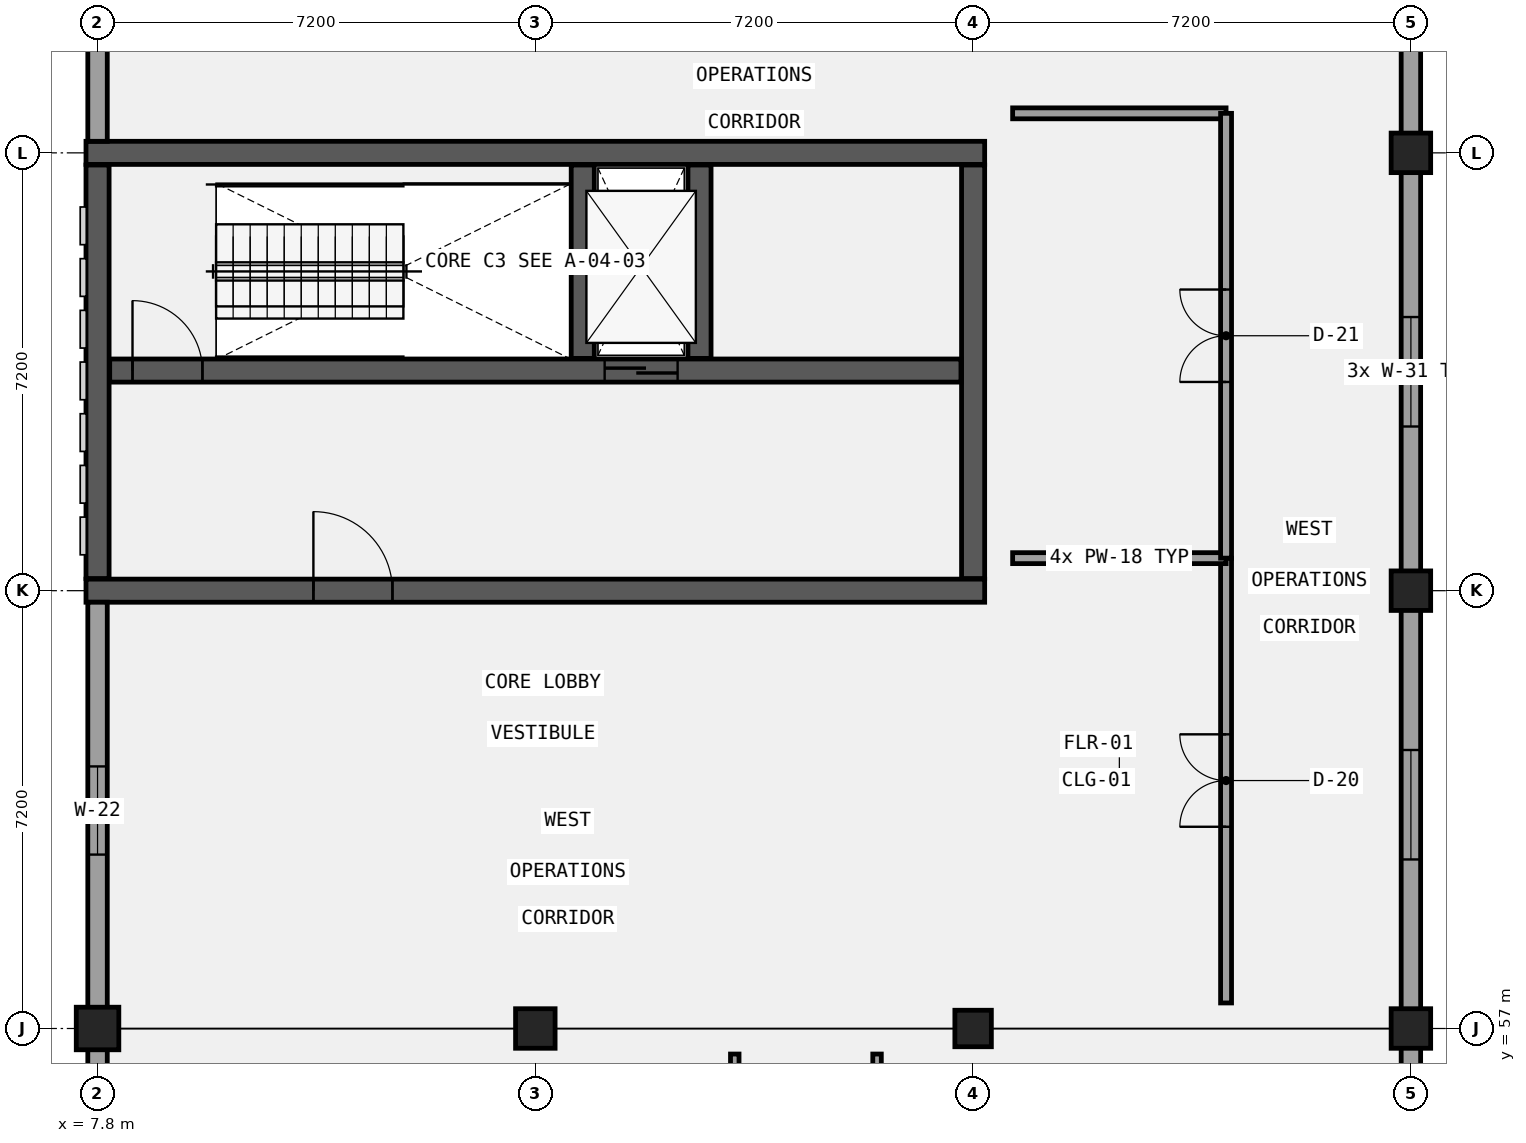
"""IFC4 building model, lengths in metres.
Left out: names, types, materials, properties, quantities, classifications, styles, units other than length and angle.
Written with IfcOpenShell. Run it as: python <this file> out.ifc"""

import sys

from ifc_helpers import new_model, si_unit, direction, frame, frame_2d, origin, origin_2d, place, context, subcontext, project, spatial, rectangle, circle, extrude, element, fill, save


model = new_model("IFC4")
c1 = context("Model", 3, precision=1e-05, world=origin(), true_north=direction((0.0, 1.0)))
c2 = subcontext(c1, "Body", "Model", "MODEL_VIEW")
j1 = project(units=[si_unit("LENGTHUNIT", "METRE"), si_unit("PLANEANGLEUNIT", "RADIAN")], contexts=[c1])
p1 = place(None, origin())
s1 = spatial("IfcSite", under=j1, at=p1, CompositionType="ELEMENT")
p2 = place(p1, origin())
s2 = spatial("IfcBuilding", under=s1, at=p2, CompositionType="ELEMENT")
p3 = place(p2, frame((0.0, 0.0, 9.6)))
s3 = spatial("IfcBuildingStorey", under=s2, at=p3, CompositionType="ELEMENT", Elevation=9.6)
p4 = place(p3, frame((7.61, 71.4, 0.0), z_axis=(0.0, 0.0, 1.0), x_axis=(1.0, 0.0, 0.0)))
e1 = element("IfcWall", 1, at=p4, inside=s3, PredefinedType="SHEAR", context=c2, shape_type="SweptSolid", body=[
    extrude(rectangle(XDim=14.78, YDim=0.38, at=frame_2d((7.39, 0.0))), origin(), (0.0, 0.0, 1.0), 4.2),
])
p5 = place(p3, frame((7.61, 64.2, 0.0), z_axis=(0.0, 0.0, 1.0), x_axis=(1.0, 0.0, 0.0)))
e2 = element("IfcWall", 2, at=p5, inside=s3, PredefinedType="SHEAR", context=c2, shape_type="SweptSolid", body=[
    extrude(rectangle(XDim=14.78, YDim=0.38, at=frame_2d((7.39, 0.0))), origin(), (0.0, 0.0, 1.0), 4.2),
])
p6 = place(p5, frame((3.74, 0.0, 0.0)))
e3 = element("IfcOpeningElement", 3, at=p6, cuts=e2, PredefinedType="OPENING", context=c2, shape_type="SweptSolid", body=[
    extrude(rectangle(XDim=1.3, YDim=2.2, at=frame_2d((0.65, 1.1))), frame((0.0, 0.2, 0.0), z_axis=(0.0, -1.0, 0.0), x_axis=(1.0, 0.0, 0.0)), (0.0, 0.0, 1.0), 0.4),
])
for number, where, z_axis, x_axis in (
    (4, (7.8, 64.4, 0.0), (0.0, 0.0, 1.0), (0.0, 1.0, 0.0)),
    (5, (22.2, 64.4, 0.0), (0.0, 0.0, 1.0), (0.0, 1.0, 0.0)),
):
    element("IfcWall", number, at=place(p3, frame(where, z_axis=z_axis, x_axis=x_axis)), inside=s3, PredefinedType="SHEAR", context=c2, shape_type="SweptSolid", body=[
        extrude(rectangle(XDim=6.8, YDim=0.38, at=frame_2d((3.4, 0.0))), origin(), (0.0, 0.0, 1.0), 4.2),
    ])
p7 = place(p3, frame((8.0, 67.82, 0.0), z_axis=(0.0, 0.0, 1.0), x_axis=(1.0, 0.0, 0.0)))
e6 = element("IfcWall", 6, at=p7, inside=s3, PredefinedType="SHEAR", context=c2, shape_type="SweptSolid", body=[
    extrude(rectangle(XDim=14.0, YDim=0.38, at=frame_2d((7.0, 0.0))), origin(), (0.0, 0.0, 1.0), 4.2),
])
p8 = place(p7, frame((8.14, 0.0, 0.0)))
e7 = element("IfcOpeningElement", 7, at=p8, cuts=e6, PredefinedType="OPENING", context=c2, shape_type="SweptSolid", body=[
    extrude(rectangle(XDim=1.2, YDim=2.15, at=frame_2d((0.6, 1.075))), frame((0.0, 0.2, 0.0), z_axis=(0.0, -1.0, 0.0), x_axis=(1.0, 0.0, 0.0)), (0.0, 0.0, 1.0), 0.4),
])
p9 = place(p7, frame((0.375, 0.0, 0.0)))
e8 = element("IfcOpeningElement", 8, at=p9, cuts=e6, PredefinedType="OPENING", context=c2, shape_type="SweptSolid", body=[
    extrude(rectangle(XDim=1.15, YDim=2.15, at=frame_2d((0.575, 1.075))), frame((0.0, 0.2, 0.0), z_axis=(0.0, -1.0, 0.0), x_axis=(1.0, 0.0, 0.0)), (0.0, 0.0, 1.0), 0.4),
])
for number, where, z_axis, x_axis in (
    (9, (15.78, 68.02, 0.0), (0.0, 0.0, 1.0), (0.0, 1.0, 0.0)),
    (10, (17.7, 68.02, 0.0), (0.0, 0.0, 1.0), (0.0, 1.0, 0.0)),
):
    element("IfcWall", number, at=place(p3, frame(where, z_axis=z_axis, x_axis=x_axis)), inside=s3, PredefinedType="SHEAR", context=c2, shape_type="SweptSolid", body=[
        extrude(rectangle(XDim=3.18, YDim=0.38, at=frame_2d((1.59, 0.0))), origin(), (0.0, 0.0, 1.0), 4.2),
    ])
p10 = place(p3, frame((7.8, 57.0, 0.0), z_axis=(0.0, 0.0, 1.0), x_axis=(1.0, 0.0, 0.0)))
e11 = element("IfcColumn", 11, at=p10, inside=s3, PredefinedType="COLUMN", context=c2, shape_type="SweptSolid", body=[
    extrude(rectangle(XDim=0.7, YDim=0.7, at=origin_2d()), origin(), (0.0, 0.0, 1.0), 4.2),
])
p11 = place(p3, frame((15.0, 57.0, 0.0), z_axis=(0.0, 0.0, 1.0), x_axis=(1.0, 0.0, 0.0)))
e12 = element("IfcColumn", 12, at=p11, inside=s3, PredefinedType="COLUMN", context=c2, shape_type="SweptSolid", body=[
    extrude(rectangle(XDim=0.65, YDim=0.65, at=origin_2d()), origin(), (0.0, 0.0, 1.0), 4.2),
])
p12 = place(p3, frame((22.2, 57.0, 0.0), z_axis=(0.0, 0.0, 1.0), x_axis=(1.0, 0.0, 0.0)))
e13 = element("IfcColumn", 13, at=p12, inside=s3, PredefinedType="COLUMN", context=c2, shape_type="SweptSolid", body=[
    extrude(rectangle(XDim=0.6, YDim=0.6, at=origin_2d()), origin(), (0.0, 0.0, 1.0), 4.2),
])
for number, where, z_axis, x_axis in (
    (14, (29.4, 57.0, 0.0), (0.0, 0.0, 1.0), (1.0, 0.0, 0.0)),
    (15, (29.4, 64.2, 0.0), (0.0, 0.0, 1.0), (1.0, 0.0, 0.0)),
    (16, (29.4, 71.4, 0.0), (0.0, 0.0, 1.0), (1.0, 0.0, 0.0)),
):
    element("IfcColumn", number, at=place(p3, frame(where, z_axis=z_axis, x_axis=x_axis)), inside=s3, PredefinedType="COLUMN", context=c2, shape_type="SweptSolid", body=[
        extrude(circle(Radius=0.325, at=origin_2d()), origin(), (0.0, 0.0, 1.0), 4.2),
    ])
p13 = place(p3, frame((7.8, 78.44, 0.0), z_axis=(0.0, 0.0, 1.0), x_axis=(0.0, -1.0, 0.0)))
e17 = element("IfcWall", 17, at=p13, inside=s3, PredefinedType="SOLIDWALL", context=c2, shape_type="SweptSolid", body=[
    extrude(rectangle(XDim=6.85, YDim=0.32, at=frame_2d((3.425, 0.0))), origin(), (0.0, 0.0, 1.0), 3.39),
])
p14 = place(p13, frame((2.525, 0.0, 1.0)))
e18 = element("IfcOpeningElement", 18, at=p14, cuts=e17, PredefinedType="OPENING", context=c2, shape_type="SweptSolid", body=[
    extrude(rectangle(XDim=1.8, YDim=2.15, at=frame_2d((0.9, 1.075))), frame((0.0, 0.17, 0.0), z_axis=(0.0, -1.0, 0.0), x_axis=(1.0, 0.0, 0.0)), (0.0, 0.0, 1.0), 0.34),
])
p15 = place(p3, frame((7.8, 64.01, 0.0), z_axis=(0.0, 0.0, 1.0), x_axis=(0.0, -1.0, 0.0)))
e19 = element("IfcWall", 19, at=p15, inside=s3, PredefinedType="SOLIDWALL", context=c2, shape_type="SweptSolid", body=[
    extrude(rectangle(XDim=6.85, YDim=0.32, at=frame_2d((3.425, 0.0))), origin(), (0.0, 0.0, 1.0), 3.04),
])
p16 = place(p15, frame((2.7, 0.0, 1.0)))
e20 = element("IfcOpeningElement", 20, at=p16, cuts=e19, PredefinedType="OPENING", context=c2, shape_type="SweptSolid", body=[
    extrude(rectangle(XDim=1.45, YDim=1.65, at=frame_2d((0.725, 0.825))), frame((0.0, 0.17, 0.0), z_axis=(0.0, -1.0, 0.0), x_axis=(1.0, 0.0, 0.0)), (0.0, 0.0, 1.0), 0.34),
])
p17 = place(p3, frame((7.8, 56.84, 0.0), z_axis=(0.0, 0.0, 1.0), x_axis=(0.0, -1.0, 0.0)))
e21 = element("IfcWall", 21, at=p17, inside=s3, PredefinedType="SOLIDWALL", context=c2, shape_type="SweptSolid", body=[
    extrude(rectangle(XDim=35.68, YDim=0.32, at=frame_2d((17.84, 0.0))), origin(), (0.0, 0.0, 1.0), 3.09),
])
p18 = place(p17, frame((31.36, 0.0, 1.0)))
e22 = element("IfcOpeningElement", 22, at=p18, cuts=e21, PredefinedType="OPENING", context=c2, shape_type="SweptSolid", body=[
    extrude(rectangle(XDim=1.6, YDim=1.4, at=frame_2d((0.8, 0.7))), frame((0.0, 0.17, 0.0), z_axis=(0.0, -1.0, 0.0), x_axis=(1.0, 0.0, 0.0)), (0.0, 0.0, 1.0), 0.34),
])
p19 = place(p17, frame((24.24, 0.0, 1.0)))
e23 = element("IfcOpeningElement", 23, at=p19, cuts=e21, PredefinedType="OPENING", context=c2, shape_type="SweptSolid", body=[
    extrude(rectangle(XDim=1.6, YDim=1.4, at=frame_2d((0.8, 0.7))), frame((0.0, 0.17, 0.0), z_axis=(0.0, -1.0, 0.0), x_axis=(1.0, 0.0, 0.0)), (0.0, 0.0, 1.0), 0.34),
])
p20 = place(p17, frame((17.04, 0.0, 1.0)))
e24 = element("IfcOpeningElement", 24, at=p20, cuts=e21, PredefinedType="OPENING", context=c2, shape_type="SweptSolid", body=[
    extrude(rectangle(XDim=1.6, YDim=1.4, at=frame_2d((0.8, 0.7))), frame((0.0, 0.17, 0.0), z_axis=(0.0, -1.0, 0.0), x_axis=(1.0, 0.0, 0.0)), (0.0, 0.0, 1.0), 0.34),
])
p21 = place(p17, frame((9.84, 0.0, 1.0)))
e25 = element("IfcOpeningElement", 25, at=p21, cuts=e21, PredefinedType="OPENING", context=c2, shape_type="SweptSolid", body=[
    extrude(rectangle(XDim=1.6, YDim=1.4, at=frame_2d((0.8, 0.7))), frame((0.0, 0.17, 0.0), z_axis=(0.0, -1.0, 0.0), x_axis=(1.0, 0.0, 0.0)), (0.0, 0.0, 1.0), 0.34),
])
p22 = place(p17, frame((2.72, 0.0, 1.0)))
e26 = element("IfcOpeningElement", 26, at=p22, cuts=e21, PredefinedType="OPENING", context=c2, shape_type="SweptSolid", body=[
    extrude(rectangle(XDim=1.6, YDim=1.4, at=frame_2d((0.8, 0.7))), frame((0.0, 0.17, 0.0), z_axis=(0.0, -1.0, 0.0), x_axis=(1.0, 0.0, 0.0)), (0.0, 0.0, 1.0), 0.34),
])
p23 = place(p3, frame((29.4, 35.56, 0.0), z_axis=(0.0, 0.0, 1.0), x_axis=(0.0, 1.0, 0.0)))
e27 = element("IfcWall", 27, at=p23, inside=s3, PredefinedType="SOLIDWALL", context=c2, shape_type="SweptSolid", body=[
    extrude(rectangle(XDim=21.28, YDim=0.32, at=frame_2d((10.64, 0.0))), origin(), (0.0, 0.0, 1.0), 2.94),
])
p24 = place(p23, frame((2.42, 0.0, 1.0)))
e28 = element("IfcOpeningElement", 28, at=p24, cuts=e27, PredefinedType="OPENING", context=c2, shape_type="SweptSolid", body=[
    extrude(rectangle(XDim=2.2, YDim=1.65, at=frame_2d((1.1, 0.825))), frame((0.0, 0.17, 0.0), z_axis=(0.0, -1.0, 0.0), x_axis=(1.0, 0.0, 0.0)), (0.0, 0.0, 1.0), 0.34),
])
p25 = place(p23, frame((9.54, 0.0, 1.0)))
e29 = element("IfcOpeningElement", 29, at=p25, cuts=e27, PredefinedType="OPENING", context=c2, shape_type="SweptSolid", body=[
    extrude(rectangle(XDim=2.2, YDim=1.65, at=frame_2d((1.1, 0.825))), frame((0.0, 0.17, 0.0), z_axis=(0.0, -1.0, 0.0), x_axis=(1.0, 0.0, 0.0)), (0.0, 0.0, 1.0), 0.34),
])
p26 = place(p23, frame((16.66, 0.0, 1.0)))
e30 = element("IfcOpeningElement", 30, at=p26, cuts=e27, PredefinedType="OPENING", context=c2, shape_type="SweptSolid", body=[
    extrude(rectangle(XDim=2.2, YDim=1.65, at=frame_2d((1.1, 0.825))), frame((0.0, 0.17, 0.0), z_axis=(0.0, -1.0, 0.0), x_axis=(1.0, 0.0, 0.0)), (0.0, 0.0, 1.0), 0.34),
])
p27 = place(p3, frame((29.4, 57.16, 0.0), z_axis=(0.0, 0.0, 1.0), x_axis=(0.0, 1.0, 0.0)))
e31 = element("IfcWall", 31, at=p27, inside=s3, PredefinedType="SOLIDWALL", context=c2, shape_type="SweptSolid", body=[
    extrude(rectangle(XDim=21.28, YDim=0.32, at=frame_2d((10.64, 0.0))), origin(), (0.0, 0.0, 1.0), 3.19),
])
p28 = place(p27, frame((2.62, 0.0, 1.0)))
e32 = element("IfcOpeningElement", 32, at=p28, cuts=e31, PredefinedType="OPENING", context=c2, shape_type="SweptSolid", body=[
    extrude(rectangle(XDim=1.8, YDim=1.4, at=frame_2d((0.9, 0.7))), frame((0.0, 0.17, 0.0), z_axis=(0.0, -1.0, 0.0), x_axis=(1.0, 0.0, 0.0)), (0.0, 0.0, 1.0), 0.34),
])
p29 = place(p27, frame((9.74, 0.0, 1.0)))
e33 = element("IfcOpeningElement", 33, at=p29, cuts=e31, PredefinedType="OPENING", context=c2, shape_type="SweptSolid", body=[
    extrude(rectangle(XDim=1.8, YDim=1.4, at=frame_2d((0.9, 0.7))), frame((0.0, 0.17, 0.0), z_axis=(0.0, -1.0, 0.0), x_axis=(1.0, 0.0, 0.0)), (0.0, 0.0, 1.0), 0.34),
])
p30 = place(p27, frame((16.86, 0.0, 1.0)))
e34 = element("IfcOpeningElement", 34, at=p30, cuts=e31, PredefinedType="OPENING", context=c2, shape_type="SweptSolid", body=[
    extrude(rectangle(XDim=1.8, YDim=1.4, at=frame_2d((0.9, 0.7))), frame((0.0, 0.17, 0.0), z_axis=(0.0, -1.0, 0.0), x_axis=(1.0, 0.0, 0.0)), (0.0, 0.0, 1.0), 0.34),
])
p31 = place(p3, frame((18.28, 49.548, 0.0), z_axis=(0.0, 0.0, 1.0), x_axis=(0.0, 1.0, 0.0)))
e35 = element("IfcWall", 35, at=p31, inside=s3, PredefinedType="PARTITIONING", context=c2, shape_type="SweptSolid", body=[
    extrude(rectangle(XDim=7.032, YDim=0.14, at=frame_2d((3.516, 0.0))), origin(), (0.0, 0.0, 1.0), 3.94),
])
p32 = place(p31, frame((2.966, 0.0, 0.0)))
e36 = element("IfcOpeningElement", 36, at=p32, cuts=e35, PredefinedType="OPENING", context=c2, shape_type="SweptSolid", body=[
    extrude(rectangle(XDim=1.1, YDim=2.35, at=frame_2d((0.55, 1.175))), frame((0.0, 0.08, 0.0), z_axis=(0.0, -1.0, 0.0), x_axis=(1.0, 0.0, 0.0)), (0.0, 0.0, 1.0), 0.16),
])
p33 = place(p3, frame((20.62, 49.548, 0.0), z_axis=(0.0, 0.0, 1.0), x_axis=(0.0, 1.0, 0.0)))
e37 = element("IfcWall", 37, at=p33, inside=s3, PredefinedType="PARTITIONING", context=c2, shape_type="SweptSolid", body=[
    extrude(rectangle(XDim=7.032, YDim=0.14, at=frame_2d((3.516, 0.0))), origin(), (0.0, 0.0, 1.0), 3.94),
])
p34 = place(p33, frame((2.836, 0.0, 0.0)))
e38 = element("IfcOpeningElement", 38, at=p34, cuts=e37, PredefinedType="OPENING", context=c2, shape_type="SweptSolid", body=[
    extrude(rectangle(XDim=1.36, YDim=2.22, at=frame_2d((0.68, 1.11))), frame((0.0, 0.08, 0.0), z_axis=(0.0, -1.0, 0.0), x_axis=(1.0, 0.0, 0.0)), (0.0, 0.0, 1.0), 0.16),
])
p35 = place(p3, frame((22.85, 72.05, 0.0), z_axis=(0.0, 0.0, 1.0), x_axis=(1.0, 0.0, 0.0)))
e39 = element("IfcWall", 39, at=p35, inside=s3, PredefinedType="PARTITIONING", context=c2, shape_type="SweptSolid", body=[
    extrude(rectangle(XDim=3.51, YDim=0.18, at=frame_2d((1.755, 0.0))), origin(), (0.0, 0.0, 1.0), 3.94),
])
p36 = place(p3, frame((26.36, 57.42, 0.0), z_axis=(0.0, 0.0, 1.0), x_axis=(0.0, 1.0, 0.0)))
e40 = element("IfcWall", 40, at=p36, inside=s3, PredefinedType="PARTITIONING", context=c2, shape_type="SweptSolid", body=[
    extrude(rectangle(XDim=7.315, YDim=0.18, at=frame_2d((3.658, 0.0))), origin(), (0.0, 0.0, 1.0), 3.94),
])
p37 = place(p36, frame((2.897, 0.0, 0.0)))
e41 = element("IfcOpeningElement", 41, at=p37, cuts=e40, PredefinedType="OPENING", context=c2, shape_type="SweptSolid", body=[
    extrude(rectangle(XDim=1.52, YDim=2.22, at=frame_2d((0.76, 1.11))), frame((0.0, 0.1, 0.0), z_axis=(0.0, -1.0, 0.0), x_axis=(1.0, 0.0, 0.0)), (0.0, 0.0, 1.0), 0.2),
])
p38 = place(p3, frame((22.85, 64.735, 0.0), z_axis=(0.0, 0.0, 1.0), x_axis=(1.0, 0.0, 0.0)))
e42 = element("IfcWall", 42, at=p38, inside=s3, PredefinedType="PARTITIONING", context=c2, shape_type="SweptSolid", body=[
    extrude(rectangle(XDim=3.51, YDim=0.18, at=frame_2d((1.755, 0.0))), origin(), (0.0, 0.0, 1.0), 3.94),
])
p39 = place(p3, frame((26.36, 64.735, 0.0), z_axis=(0.0, 0.0, 1.0), x_axis=(0.0, 1.0, 0.0)))
e43 = element("IfcWall", 43, at=p39, inside=s3, PredefinedType="PARTITIONING", context=c2, shape_type="SweptSolid", body=[
    extrude(rectangle(XDim=7.315, YDim=0.18, at=frame_2d((3.657, 0.0))), origin(), (0.0, 0.0, 1.0), 3.94),
])
p40 = place(p39, frame((2.897, 0.0, 0.0)))
e44 = element("IfcOpeningElement", 44, at=p40, cuts=e43, PredefinedType="OPENING", context=c2, shape_type="SweptSolid", body=[
    extrude(rectangle(XDim=1.52, YDim=2.35, at=frame_2d((0.76, 1.175))), frame((0.0, 0.1, 0.0), z_axis=(0.0, -1.0, 0.0), x_axis=(1.0, 0.0, 0.0)), (0.0, 0.0, 1.0), 0.2),
])
p41 = place(p8, frame((1.2, 0.0, 0.0), z_axis=(0.0, 0.0, 1.0), x_axis=(-1.0, 0.0, 0.0)))
e45 = element("IfcDoor", 45, at=p41, inside=s3, OperationType="DOUBLE_DOOR_SLIDING", PredefinedType="DOOR", context=c2, shape_type="SweptSolid", body=[
    extrude(rectangle(XDim=1.2, YDim=2.15, at=frame_2d((0.6, 1.075))), frame((0.0, 0.025, 0.0), z_axis=(0.0, -1.0, 0.0), x_axis=(1.0, 0.0, 0.0)), (0.0, 0.0, 1.0), 0.05),
])
fill(e7, e45)
p42 = place(p9, origin())
e46 = element("IfcDoor", 46, at=p42, inside=s3, OperationType="SINGLE_SWING_LEFT", PredefinedType="DOOR", context=c2, shape_type="SweptSolid", body=[
    extrude(rectangle(XDim=1.15, YDim=2.15, at=frame_2d((0.575, 1.075))), frame((0.0, 0.025, 0.0), z_axis=(0.0, -1.0, 0.0), x_axis=(1.0, 0.0, 0.0)), (0.0, 0.0, 1.0), 0.05),
])
fill(e8, e46)
p43 = place(p6, frame((1.3, 0.0, 0.0), z_axis=(0.0, 0.0, 1.0), x_axis=(-1.0, 0.0, 0.0)))
e47 = element("IfcDoor", 47, at=p43, inside=s3, OperationType="SINGLE_SWING_LEFT", PredefinedType="DOOR", context=c2, shape_type="SweptSolid", body=[
    extrude(rectangle(XDim=1.3, YDim=2.2, at=frame_2d((0.65, 1.1))), frame((0.0, 0.025, 0.0), z_axis=(0.0, -1.0, 0.0), x_axis=(1.0, 0.0, 0.0)), (0.0, 0.0, 1.0), 0.05),
])
fill(e3, e47)
p44 = place(p16, origin())
e48 = element("IfcWindow", 48, at=p44, inside=s3, PartitioningType="SINGLE_PANEL", PredefinedType="WINDOW", context=c2, shape_type="SweptSolid", body=[
    extrude(rectangle(XDim=1.45, YDim=1.65, at=frame_2d((0.725, 0.825))), frame((0.0, 0.03, 0.0), z_axis=(0.0, -1.0, 0.0), x_axis=(1.0, 0.0, 0.0)), (0.0, 0.0, 1.0), 0.06),
])
fill(e20, e48)
p45 = place(p28, origin())
e49 = element("IfcWindow", 49, at=p45, inside=s3, PartitioningType="SINGLE_PANEL", PredefinedType="WINDOW", context=c2, shape_type="SweptSolid", body=[
    extrude(rectangle(XDim=1.8, YDim=1.4, at=frame_2d((0.9, 0.7))), frame((0.0, 0.03, 0.0), z_axis=(0.0, -1.0, 0.0), x_axis=(1.0, 0.0, 0.0)), (0.0, 0.0, 1.0), 0.06),
])
fill(e32, e49)
p46 = place(p29, origin())
e50 = element("IfcWindow", 50, at=p46, inside=s3, PartitioningType="SINGLE_PANEL", PredefinedType="WINDOW", context=c2, shape_type="SweptSolid", body=[
    extrude(rectangle(XDim=1.8, YDim=1.4, at=frame_2d((0.9, 0.7))), frame((0.0, 0.03, 0.0), z_axis=(0.0, -1.0, 0.0), x_axis=(1.0, 0.0, 0.0)), (0.0, 0.0, 1.0), 0.06),
])
fill(e33, e50)
p47 = place(p37, frame((1.52, 0.0, 0.0), z_axis=(0.0, 0.0, 1.0), x_axis=(-1.0, 0.0, 0.0)))
e51 = element("IfcDoor", 51, at=p47, inside=s3, OperationType="DOUBLE_DOOR_SINGLE_SWING", PredefinedType="DOOR", context=c2, shape_type="SweptSolid", body=[
    extrude(rectangle(XDim=1.52, YDim=2.22, at=frame_2d((0.76, 1.11))), frame((0.0, 0.025, 0.0), z_axis=(0.0, -1.0, 0.0), x_axis=(1.0, 0.0, 0.0)), (0.0, 0.0, 1.0), 0.05),
])
fill(e41, e51)
p48 = place(p40, frame((1.52, 0.0, 0.0), z_axis=(0.0, 0.0, 1.0), x_axis=(-1.0, 0.0, 0.0)))
e52 = element("IfcDoor", 52, at=p48, inside=s3, OperationType="DOUBLE_DOOR_SINGLE_SWING", PredefinedType="DOOR", context=c2, shape_type="SweptSolid", body=[
    extrude(rectangle(XDim=1.52, YDim=2.35, at=frame_2d((0.76, 1.175))), frame((0.0, 0.025, 0.0), z_axis=(0.0, -1.0, 0.0), x_axis=(1.0, 0.0, 0.0)), (0.0, 0.0, 1.0), 0.05),
])
fill(e44, e52)
save(model, sys.argv[1])
